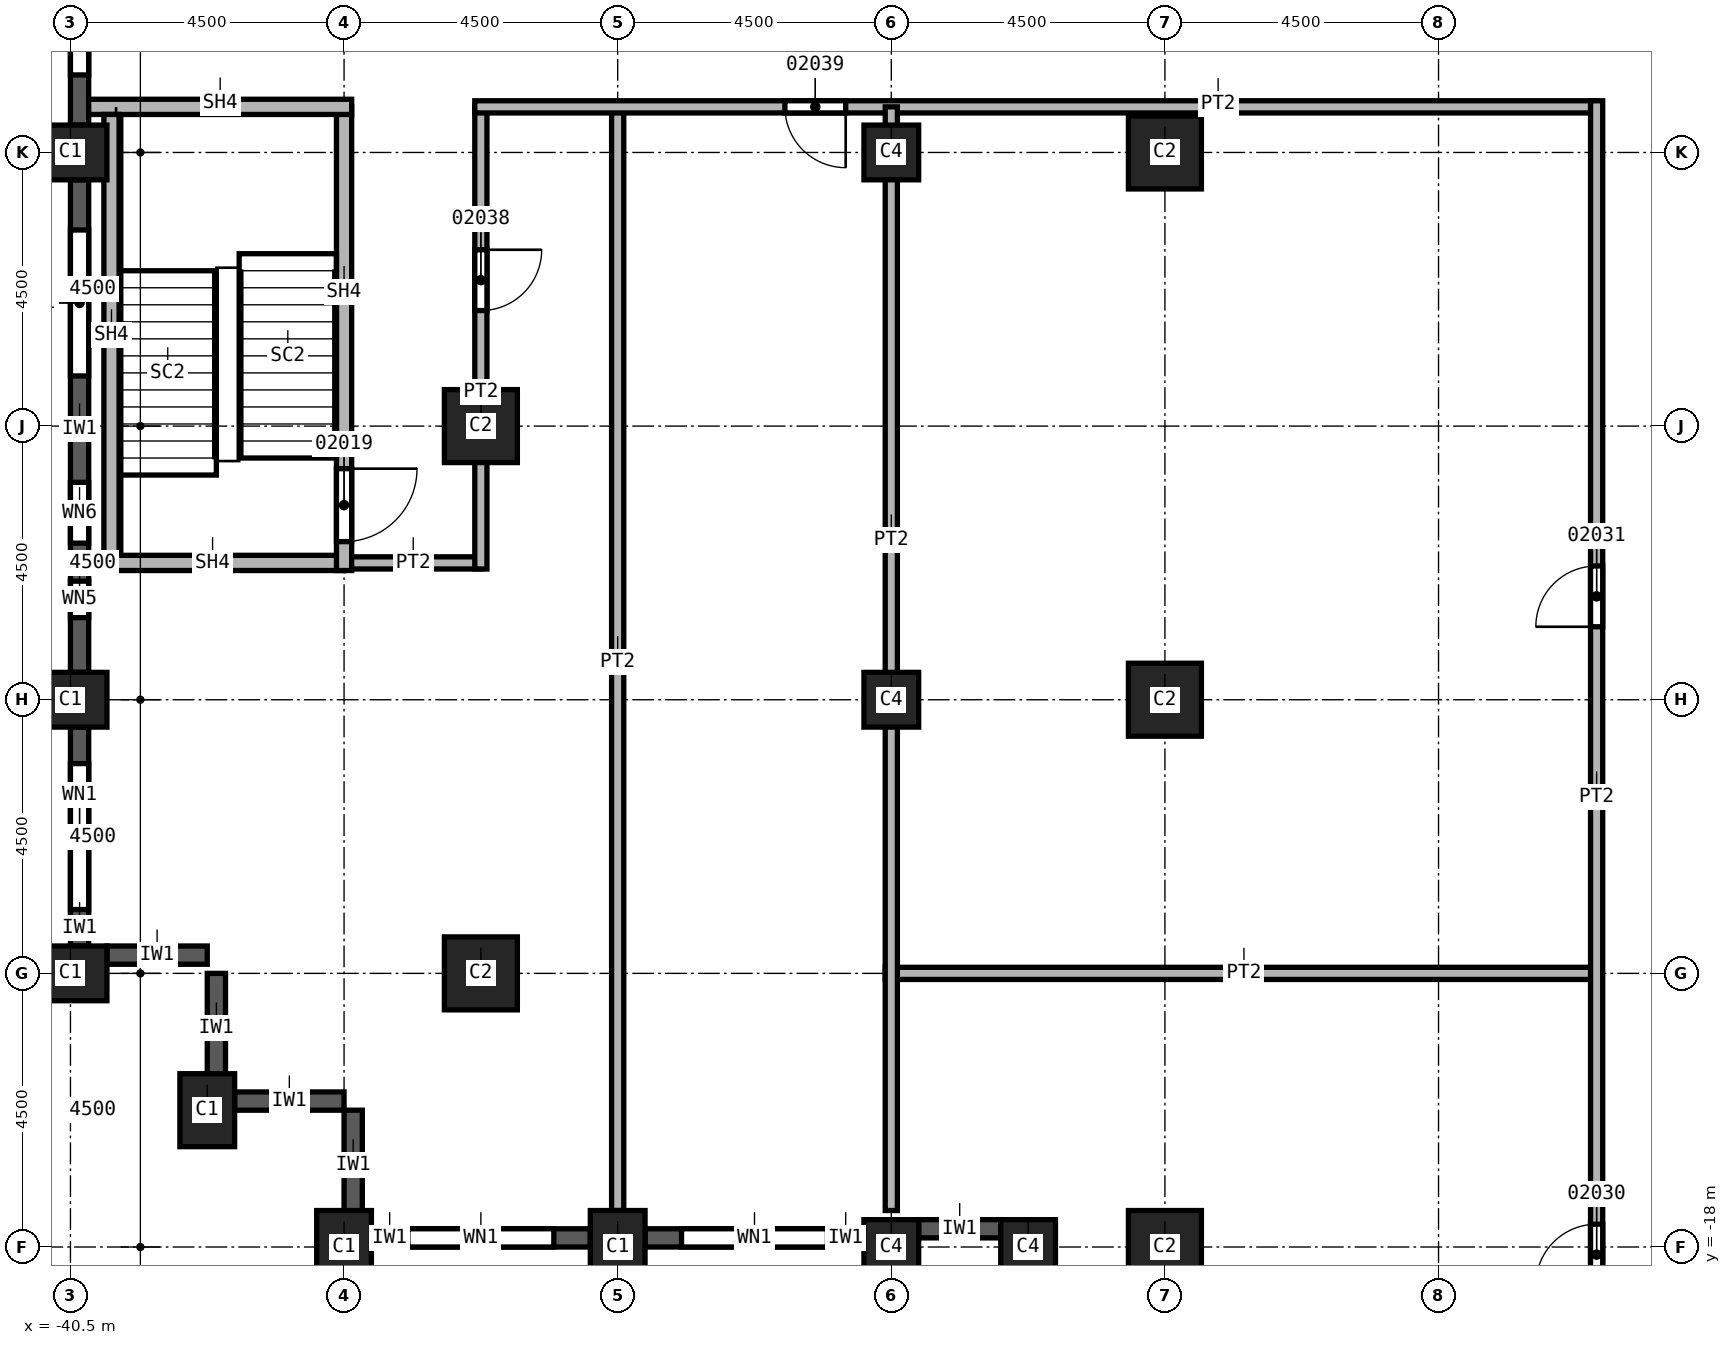
"""IFC4 building model, lengths in metres.
Left out: names, types, materials, properties, quantities, classifications, styles, units other than length and angle.
Written with IfcOpenShell. Run it as: python <this file> out.ifc"""

import sys

from ifc_helpers import new_model, si_unit, direction, frame, frame_2d, origin, origin_2d, place, context, subcontext, project, spatial, rectangle, extrude, element, fill, save


model = new_model("IFC4")
c1 = context("Model", 3, precision=1e-05, world=origin(), true_north=direction((0.0, 1.0)))
c2 = subcontext(c1, "Body", "Model", "MODEL_VIEW")
j1 = project(units=[si_unit("LENGTHUNIT", "METRE"), si_unit("PLANEANGLEUNIT", "RADIAN")], contexts=[c1])
p1 = place(None, origin())
s1 = spatial("IfcSite", under=j1, at=p1, CompositionType="ELEMENT")
p2 = place(p1, origin())
s2 = spatial("IfcBuilding", under=s1, at=p2, CompositionType="ELEMENT")
p3 = place(p2, frame((0.0, 0.0, 80.0)))
s3 = spatial("IfcBuildingStorey", under=s2, at=p3, CompositionType="ELEMENT", Elevation=80.0)
for number, where, z_axis, x_axis in (
    (1, (-40.5, 0.0, 0.0), (0.0, 0.0, 1.0), (0.0, 1.0, 0.0)),
    (2, (-40.5, -9.0, 0.0), (0.0, 0.0, 1.0), (0.0, 1.0, 0.0)),
    (3, (-40.5, -13.5, 0.0), (0.0, 0.0, 1.0), (0.0, 1.0, 0.0)),
    (4, (-38.25, -15.75, 0.0), (0.0, 0.0, 1.0), (1.0, 0.0, 0.0)),
    (5, (-31.5, -18.0, 0.0), (0.0, 0.0, 1.0), (1.0, 0.0, 0.0)),
    (6, (-36.0, -18.0, 0.0), (0.0, 0.0, 1.0), (1.0, 0.0, 0.0)),
):
    element("IfcColumn", number, at=place(p3, frame(where, z_axis=z_axis, x_axis=x_axis)), inside=s3, PredefinedType="COLUMN", context=c2, shape_type="SweptSolid", body=[
        extrude(rectangle(XDim=0.9, YDim=1.2, at=origin_2d()), origin(), (0.0, 0.0, 1.0), 3.7),
    ])
for number, where, z_axis, x_axis in (
    (7, (-33.75, -4.5, 0.0), (0.0, 0.0, 1.0), (1.0, 0.0, 0.0)),
    (8, (-33.75, -13.5, 0.0), (0.0, 0.0, 1.0), (1.0, 0.0, 0.0)),
    (9, (-22.5, 0.0, 0.0), (0.0, 0.0, 1.0), (1.0, 0.0, 0.0)),
    (10, (-22.5, -9.0, 0.0), (0.0, 0.0, 1.0), (1.0, 0.0, 0.0)),
    (11, (-22.5, -18.0, 0.0), (0.0, 0.0, 1.0), (1.0, 0.0, 0.0)),
):
    element("IfcColumn", number, at=place(p3, frame(where, z_axis=z_axis, x_axis=x_axis)), inside=s3, PredefinedType="COLUMN", context=c2, shape_type="SweptSolid", body=[
        extrude(rectangle(XDim=1.2, YDim=1.2, at=origin_2d()), origin(), (0.0, 0.0, 1.0), 3.7),
    ])
for number, where, z_axis, x_axis in (
    (12, (-27.0, 0.0, 0.0), (0.0, 0.0, 1.0), (1.0, 0.0, 0.0)),
    (13, (-27.0, -9.0, 0.0), (0.0, 0.0, 1.0), (1.0, 0.0, 0.0)),
    (14, (-27.0, -18.0, 0.0), (0.0, 0.0, 1.0), (1.0, 0.0, 0.0)),
    (15, (-24.75, -18.0, 0.0), (0.0, 0.0, 1.0), (1.0, 0.0, 0.0)),
):
    element("IfcColumn", number, at=place(p3, frame(where, z_axis=z_axis, x_axis=x_axis)), inside=s3, PredefinedType="COLUMN", context=c2, shape_type="SweptSolid", body=[
        extrude(rectangle(XDim=0.9, YDim=0.9, at=origin_2d()), origin(), (0.0, 0.0, 1.0), 3.7),
    ])
p4 = place(p3, frame((-39.9, -13.2, 0.0), z_axis=(0.0, 0.0, 1.0), x_axis=(1.0, 0.0, 0.0)))
e16 = element("IfcWall", 16, at=p4, inside=s3, PredefinedType="SOLIDWALL", context=c2, shape_type="SweptSolid", body=[
    extrude(rectangle(XDim=1.65, YDim=0.3, at=frame_2d((0.825, 0.0))), origin(), (0.0, 0.0, 1.0), 3.1),
])
for number, where, z_axis, x_axis in (
    (17, (-38.1, -15.3, 0.0), (0.0, 0.0, 1.0), (0.0, 1.0, 0.0)),
    (18, (-37.8, -15.6, 0.0), (0.0, 0.0, 1.0), (1.0, 0.0, 0.0)),
    (19, (-35.85, -17.55, 0.0), (0.0, 0.0, 1.0), (0.0, 1.0, 0.0)),
):
    element("IfcWall", number, at=place(p3, frame(where, z_axis=z_axis, x_axis=x_axis)), inside=s3, PredefinedType="SOLIDWALL", context=c2, shape_type="SweptSolid", body=[
        extrude(rectangle(XDim=1.8, YDim=0.3, at=frame_2d((0.9, 0.0))), origin(), (0.0, 0.0, 1.0), 3.1),
    ])
p5 = place(p3, frame((-40.35, 8.55, 0.0), z_axis=(0.0, 0.0, 1.0), x_axis=(0.0, -1.0, 0.0)))
e20 = element("IfcWall", 20, at=p5, inside=s3, PredefinedType="SOLIDWALL", context=c2, shape_type="SweptSolid", body=[
    extrude(rectangle(XDim=8.1, YDim=0.3, at=frame_2d((4.05, 0.0))), origin(), (0.0, 0.0, 1.0), 3.1),
])
p6 = place(p5, frame((0.825, 0.0, 0.8)))
e21 = element("IfcOpeningElement", 21, at=p6, cuts=e20, PredefinedType="OPENING", context=c2, shape_type="SweptSolid", body=[
    extrude(rectangle(XDim=2.4, YDim=1.95, at=frame_2d((1.2, 0.975))), frame((0.0, 0.15, 0.0), z_axis=(0.0, -1.0, 0.0), x_axis=(1.0, 0.0, 0.0)), (0.0, 0.0, 1.0), 0.3),
])
p7 = place(p5, frame((4.875, 0.0, 0.8)))
e22 = element("IfcOpeningElement", 22, at=p7, cuts=e20, PredefinedType="OPENING", context=c2, shape_type="SweptSolid", body=[
    extrude(rectangle(XDim=2.4, YDim=1.95, at=frame_2d((1.2, 0.975))), frame((0.0, 0.15, 0.0), z_axis=(0.0, -1.0, 0.0), x_axis=(1.0, 0.0, 0.0)), (0.0, 0.0, 1.0), 0.3),
])
p8 = place(p3, frame((-40.35, -0.45, 0.0), z_axis=(0.0, 0.0, 1.0), x_axis=(0.0, -1.0, 0.0)))
e23 = element("IfcWall", 23, at=p8, inside=s3, PredefinedType="SOLIDWALL", context=c2, shape_type="SweptSolid", body=[
    extrude(rectangle(XDim=8.1, YDim=0.3, at=frame_2d((4.05, 0.0))), origin(), (0.0, 0.0, 1.0), 3.1),
])
p9 = place(p8, frame((0.825, 0.0, 0.8)))
e24 = element("IfcOpeningElement", 24, at=p9, cuts=e23, PredefinedType="OPENING", context=c2, shape_type="SweptSolid", body=[
    extrude(rectangle(XDim=2.4, YDim=1.95, at=frame_2d((1.2, 0.975))), frame((0.0, 0.15, 0.0), z_axis=(0.0, -1.0, 0.0), x_axis=(1.0, 0.0, 0.0)), (0.0, 0.0, 1.0), 0.3),
])
p10 = place(p8, frame((4.975, 0.0, 0.8)))
e25 = element("IfcOpeningElement", 25, at=p10, cuts=e23, PredefinedType="OPENING", context=c2, shape_type="SweptSolid", body=[
    extrude(rectangle(XDim=1.0, YDim=1.95, at=frame_2d((0.5, 0.975))), frame((0.0, 0.15, 0.0), z_axis=(0.0, -1.0, 0.0), x_axis=(1.0, 0.0, 0.0)), (0.0, 0.0, 1.0), 0.3),
])
p11 = place(p8, frame((6.6, 0.0, 0.8)))
e26 = element("IfcOpeningElement", 26, at=p11, cuts=e23, PredefinedType="OPENING", context=c2, shape_type="SweptSolid", body=[
    extrude(rectangle(XDim=0.6, YDim=1.95, at=frame_2d((0.3, 0.975))), frame((0.0, 0.15, 0.0), z_axis=(0.0, -1.0, 0.0), x_axis=(1.0, 0.0, 0.0)), (0.0, 0.0, 1.0), 0.3),
])
p12 = place(p3, frame((-40.35, -9.45, 0.0), z_axis=(0.0, 0.0, 1.0), x_axis=(0.0, -1.0, 0.0)))
e27 = element("IfcWall", 27, at=p12, inside=s3, PredefinedType="SOLIDWALL", context=c2, shape_type="SweptSolid", body=[
    extrude(rectangle(XDim=3.6, YDim=0.3, at=frame_2d((1.8, 0.0))), origin(), (0.0, 0.0, 1.0), 3.1),
])
p13 = place(p12, frame((0.6, 0.0, 0.8)))
e28 = element("IfcOpeningElement", 28, at=p13, cuts=e27, PredefinedType="OPENING", context=c2, shape_type="SweptSolid", body=[
    extrude(rectangle(XDim=2.4, YDim=1.95, at=frame_2d((1.2, 0.975))), frame((0.0, 0.15, 0.0), z_axis=(0.0, -1.0, 0.0), x_axis=(1.0, 0.0, 0.0)), (0.0, 0.0, 1.0), 0.3),
])
p14 = place(p3, frame((-35.55, -17.85, 0.0), z_axis=(0.0, 0.0, 1.0), x_axis=(1.0, 0.0, 0.0)))
e29 = element("IfcWall", 29, at=p14, inside=s3, PredefinedType="SOLIDWALL", context=c2, shape_type="SweptSolid", body=[
    extrude(rectangle(XDim=3.6, YDim=0.3, at=frame_2d((1.8, 0.0))), origin(), (0.0, 0.0, 1.0), 3.1),
])
p15 = place(p14, frame((0.6, 0.0, 0.8)))
e30 = element("IfcOpeningElement", 30, at=p15, cuts=e29, PredefinedType="OPENING", context=c2, shape_type="SweptSolid", body=[
    extrude(rectangle(XDim=2.4, YDim=1.95, at=frame_2d((1.2, 0.975))), frame((0.0, 0.15, 0.0), z_axis=(0.0, -1.0, 0.0), x_axis=(1.0, 0.0, 0.0)), (0.0, 0.0, 1.0), 0.3),
])
p16 = place(p3, frame((-31.05, -17.85, 0.0), z_axis=(0.0, 0.0, 1.0), x_axis=(1.0, 0.0, 0.0)))
e31 = element("IfcWall", 31, at=p16, inside=s3, PredefinedType="SOLIDWALL", context=c2, shape_type="SweptSolid", body=[
    extrude(rectangle(XDim=3.6, YDim=0.3, at=frame_2d((1.8, 0.0))), origin(), (0.0, 0.0, 1.0), 3.1),
])
p17 = place(p16, frame((0.6, 0.0, 0.8)))
e32 = element("IfcOpeningElement", 32, at=p17, cuts=e31, PredefinedType="OPENING", context=c2, shape_type="SweptSolid", body=[
    extrude(rectangle(XDim=2.4, YDim=1.95, at=frame_2d((1.2, 0.975))), frame((0.0, 0.15, 0.0), z_axis=(0.0, -1.0, 0.0), x_axis=(1.0, 0.0, 0.0)), (0.0, 0.0, 1.0), 0.3),
])
p18 = place(p3, frame((-26.55, -17.7, 0.0), z_axis=(0.0, 0.0, 1.0), x_axis=(1.0, 0.0, 0.0)))
e33 = element("IfcWall", 33, at=p18, inside=s3, PredefinedType="SOLIDWALL", context=c2, shape_type="SweptSolid", body=[
    extrude(rectangle(XDim=1.35, YDim=0.3, at=frame_2d((0.675, 0.0))), origin(), (0.0, 0.0, 1.0), 3.1),
])
p19 = place(p3, frame((-33.75, -6.75, 0.0), z_axis=(0.0, 0.0, 1.0), x_axis=(-1.0, 0.0, 0.0)))
e34 = element("IfcWall", 34, at=p19, inside=s3, PredefinedType="PARTITIONING", context=c2, shape_type="SweptSolid", body=[
    extrude(rectangle(XDim=2.25, YDim=0.2, at=frame_2d((1.125, 0.0))), origin(), (0.0, 0.0, 1.0), 3.7),
])
p20 = place(p3, frame((-33.75, 0.75, 0.0), z_axis=(0.0, 0.0, 1.0), x_axis=(0.0, -1.0, 0.0)))
e35 = element("IfcWall", 35, at=p20, inside=s3, PredefinedType="PARTITIONING", context=c2, shape_type="SweptSolid", body=[
    extrude(rectangle(XDim=7.6, YDim=0.2, at=frame_2d((3.8, 0.0))), origin(), (0.0, 0.0, 1.0), 3.7),
])
p21 = place(p20, frame((2.35, 0.0, 0.0)))
e36 = element("IfcOpeningElement", 36, at=p21, cuts=e35, PredefinedType="OPENING", context=c2, shape_type="SweptSolid", body=[
    extrude(rectangle(XDim=1.0, YDim=2.1, at=frame_2d((0.5, 1.05))), frame((0.0, 0.1, 0.0), z_axis=(0.0, -1.0, 0.0), x_axis=(1.0, 0.0, 0.0)), (0.0, 0.0, 1.0), 0.2),
])
p22 = place(p3, frame((-31.5, 0.75, 0.0), z_axis=(0.0, 0.0, 1.0), x_axis=(0.0, -1.0, 0.0)))
e37 = element("IfcWall", 37, at=p22, inside=s3, PredefinedType="PARTITIONING", context=c2, shape_type="SweptSolid", body=[
    extrude(rectangle(XDim=18.15, YDim=0.2, at=frame_2d((9.075, 0.0))), origin(), (0.0, 0.0, 1.0), 3.7),
])
p23 = place(p3, frame((-15.4, 0.75, 0.0), z_axis=(0.0, 0.0, 1.0), x_axis=(-1.0, 0.0, 0.0)))
e38 = element("IfcWall", 38, at=p23, inside=s3, PredefinedType="PARTITIONING", context=c2, shape_type="SweptSolid", body=[
    extrude(rectangle(XDim=18.45, YDim=0.2, at=frame_2d((9.225, 0.0))), origin(), (0.0, 0.0, 1.0), 3.7),
])
p24 = place(p23, frame((12.35, 0.0, 0.0)))
e39 = element("IfcOpeningElement", 39, at=p24, cuts=e38, PredefinedType="OPENING", context=c2, shape_type="SweptSolid", body=[
    extrude(rectangle(XDim=1.0, YDim=2.1, at=frame_2d((0.5, 1.05))), frame((0.0, 0.1, 0.0), z_axis=(0.0, -1.0, 0.0), x_axis=(1.0, 0.0, 0.0)), (0.0, 0.0, 1.0), 0.2),
])
p25 = place(p3, frame((-27.1, -13.5, 0.0), z_axis=(0.0, 0.0, 1.0), x_axis=(1.0, 0.0, 0.0)))
e40 = element("IfcWall", 40, at=p25, inside=s3, PredefinedType="PARTITIONING", context=c2, shape_type="SweptSolid", body=[
    extrude(rectangle(XDim=11.7, YDim=0.2, at=frame_2d((5.85, 0.0))), origin(), (0.0, 0.0, 1.0), 3.7),
])
p26 = place(p3, frame((-27.0, -17.4, 0.0), z_axis=(0.0, 0.0, 1.0), x_axis=(0.0, 1.0, 0.0)))
e41 = element("IfcWall", 41, at=p26, inside=s3, PredefinedType="PARTITIONING", context=c2, shape_type="SweptSolid", body=[
    extrude(rectangle(XDim=18.15, YDim=0.2, at=frame_2d((9.075, 0.0))), origin(), (0.0, 0.0, 1.0), 3.7),
])
p27 = place(p3, frame((-15.4, -24.5, 0.0), z_axis=(0.0, 0.0, 1.0), x_axis=(0.0, 1.0, 0.0)))
e42 = element("IfcWall", 42, at=p27, inside=s3, PredefinedType="PARTITIONING", context=c2, shape_type="SweptSolid", body=[
    extrude(rectangle(XDim=25.35, YDim=0.2, at=frame_2d((12.675, 0.0))), origin(), (0.0, 0.0, 1.0), 3.7),
])
p28 = place(p27, frame((2.5, 0.0, 0.0)))
e43 = element("IfcOpeningElement", 43, at=p28, cuts=e42, PredefinedType="OPENING", context=c2, shape_type="SweptSolid", body=[
    extrude(rectangle(XDim=1.0, YDim=2.1, at=frame_2d((0.5, 1.05))), frame((0.0, 0.1, 0.0), z_axis=(0.0, -1.0, 0.0), x_axis=(1.0, 0.0, 0.0)), (0.0, 0.0, 1.0), 0.2),
])
p29 = place(p27, frame((5.875, 0.0, 0.0)))
e44 = element("IfcOpeningElement", 44, at=p29, cuts=e42, PredefinedType="OPENING", context=c2, shape_type="SweptSolid", body=[
    extrude(rectangle(XDim=1.0, YDim=2.1, at=frame_2d((0.5, 1.05))), frame((0.0, 0.1, 0.0), z_axis=(0.0, -1.0, 0.0), x_axis=(1.0, 0.0, 0.0)), (0.0, 0.0, 1.0), 0.2),
])
p30 = place(p27, frame((16.7, 0.0, 0.0)))
e45 = element("IfcOpeningElement", 45, at=p30, cuts=e42, PredefinedType="OPENING", context=c2, shape_type="SweptSolid", body=[
    extrude(rectangle(XDim=1.0, YDim=2.1, at=frame_2d((0.5, 1.05))), frame((0.0, 0.1, 0.0), z_axis=(0.0, -1.0, 0.0), x_axis=(1.0, 0.0, 0.0)), (0.0, 0.0, 1.0), 0.2),
])
p31 = place(p3, frame((-36.0, -6.75, 0.0), z_axis=(0.0, 0.0, 1.0), x_axis=(-1.0, 0.0, 0.0)))
e46 = element("IfcWall", 46, at=p31, inside=s3, PredefinedType="SOLIDWALL", context=c2, shape_type="SweptSolid", body=[
    extrude(rectangle(XDim=4.2, YDim=0.25, at=frame_2d((2.1, 0.0))), origin(), (0.0, 0.0, 1.0), 3.7),
])
p32 = place(p3, frame((-36.0, 0.75, 0.0), z_axis=(0.0, 0.0, 1.0), x_axis=(0.0, -1.0, 0.0)))
e47 = element("IfcWall", 47, at=p32, inside=s3, PredefinedType="SOLIDWALL", context=c2, shape_type="SweptSolid", body=[
    extrude(rectangle(XDim=7.625, YDim=0.25, at=frame_2d((3.812, 0.0))), origin(), (0.0, 0.0, 1.0), 3.7),
])
p33 = place(p32, frame((5.95, 0.0, 0.0)))
e48 = element("IfcOpeningElement", 48, at=p33, cuts=e47, PredefinedType="OPENING", context=c2, shape_type="SweptSolid", body=[
    extrude(rectangle(XDim=1.2, YDim=2.1, at=frame_2d((0.6, 1.05))), frame((0.0, 0.125, 0.0), z_axis=(0.0, -1.0, 0.0), x_axis=(1.0, 0.0, 0.0)), (0.0, 0.0, 1.0), 0.25),
])
p34 = place(p3, frame((-35.875, 0.75, 0.0), z_axis=(0.0, 0.0, 1.0), x_axis=(-1.0, 0.0, 0.0)))
e49 = element("IfcWall", 49, at=p34, inside=s3, PredefinedType="SOLIDWALL", context=c2, shape_type="SweptSolid", body=[
    extrude(rectangle(XDim=4.325, YDim=0.25, at=frame_2d((2.163, 0.0))), origin(), (0.0, 0.0, 1.0), 3.7),
])
p35 = place(p3, frame((-39.825, -6.625, 0.0), z_axis=(0.0, 0.0, 1.0), x_axis=(0.0, 1.0, 0.0)))
e50 = element("IfcWall", 50, at=p35, inside=s3, PredefinedType="SOLIDWALL", context=c2, shape_type="SweptSolid", body=[
    extrude(rectangle(XDim=7.25, YDim=0.25, at=frame_2d((3.625, 0.0))), origin(), (0.0, 0.0, 1.0), 3.7),
])
p36 = place(p7, origin())
e51 = element("IfcWindow", 51, at=p36, inside=s3, PartitioningType="SINGLE_PANEL", PredefinedType="WINDOW", context=c2, shape_type="SweptSolid", body=[
    extrude(rectangle(XDim=2.4, YDim=1.95, at=frame_2d((1.2, 0.975))), frame((0.0, 0.03, 0.0), z_axis=(0.0, -1.0, 0.0), x_axis=(1.0, 0.0, 0.0)), (0.0, 0.0, 1.0), 0.06),
])
fill(e22, e51)
p37 = place(p9, origin())
e52 = element("IfcWindow", 52, at=p37, inside=s3, PartitioningType="SINGLE_PANEL", PredefinedType="WINDOW", context=c2, shape_type="SweptSolid", body=[
    extrude(rectangle(XDim=2.4, YDim=1.95, at=frame_2d((1.2, 0.975))), frame((0.0, 0.03, 0.0), z_axis=(0.0, -1.0, 0.0), x_axis=(1.0, 0.0, 0.0)), (0.0, 0.0, 1.0), 0.06),
])
fill(e24, e52)
p38 = place(p13, origin())
e53 = element("IfcWindow", 53, at=p38, inside=s3, PartitioningType="SINGLE_PANEL", PredefinedType="WINDOW", context=c2, shape_type="SweptSolid", body=[
    extrude(rectangle(XDim=2.4, YDim=1.95, at=frame_2d((1.2, 0.975))), frame((0.0, 0.03, 0.0), z_axis=(0.0, -1.0, 0.0), x_axis=(1.0, 0.0, 0.0)), (0.0, 0.0, 1.0), 0.06),
])
fill(e28, e53)
p39 = place(p15, origin())
e54 = element("IfcWindow", 54, at=p39, inside=s3, PartitioningType="SINGLE_PANEL", PredefinedType="WINDOW", context=c2, shape_type="SweptSolid", body=[
    extrude(rectangle(XDim=2.4, YDim=1.95, at=frame_2d((1.2, 0.975))), frame((0.0, 0.03, 0.0), z_axis=(0.0, -1.0, 0.0), x_axis=(1.0, 0.0, 0.0)), (0.0, 0.0, 1.0), 0.06),
])
fill(e30, e54)
p40 = place(p17, origin())
e55 = element("IfcWindow", 55, at=p40, inside=s3, PartitioningType="SINGLE_PANEL", PredefinedType="WINDOW", context=c2, shape_type="SweptSolid", body=[
    extrude(rectangle(XDim=2.4, YDim=1.95, at=frame_2d((1.2, 0.975))), frame((0.0, 0.03, 0.0), z_axis=(0.0, -1.0, 0.0), x_axis=(1.0, 0.0, 0.0)), (0.0, 0.0, 1.0), 0.06),
])
fill(e32, e55)
p41 = place(p33, origin())
e56 = element("IfcDoor", 56, at=p41, inside=s3, OperationType="SINGLE_SWING_RIGHT", PredefinedType="DOOR", context=c2, shape_type="SweptSolid", body=[
    extrude(rectangle(XDim=1.2, YDim=2.1, at=frame_2d((0.6, 1.05))), frame((0.0, 0.025, 0.0), z_axis=(0.0, -1.0, 0.0), x_axis=(1.0, 0.0, 0.0)), (0.0, 0.0, 1.0), 0.05),
])
fill(e48, e56)
p42 = place(p29, origin())
e57 = element("IfcDoor", 57, at=p42, inside=s3, OperationType="SINGLE_SWING_LEFT", PredefinedType="DOOR", context=c2, shape_type="SweptSolid", body=[
    extrude(rectangle(XDim=1.0, YDim=2.1, at=frame_2d((0.5, 1.05))), frame((0.0, 0.025, 0.0), z_axis=(0.0, -1.0, 0.0), x_axis=(1.0, 0.0, 0.0)), (0.0, 0.0, 1.0), 0.05),
])
fill(e44, e57)
p43 = place(p30, origin())
e58 = element("IfcDoor", 58, at=p43, inside=s3, OperationType="SINGLE_SWING_RIGHT", PredefinedType="DOOR", context=c2, shape_type="SweptSolid", body=[
    extrude(rectangle(XDim=1.0, YDim=2.1, at=frame_2d((0.5, 1.05))), frame((0.0, 0.025, 0.0), z_axis=(0.0, -1.0, 0.0), x_axis=(1.0, 0.0, 0.0)), (0.0, 0.0, 1.0), 0.05),
])
fill(e45, e58)
p44 = place(p21, origin())
e59 = element("IfcDoor", 59, at=p44, inside=s3, OperationType="SINGLE_SWING_LEFT", PredefinedType="DOOR", context=c2, shape_type="SweptSolid", body=[
    extrude(rectangle(XDim=1.0, YDim=2.1, at=frame_2d((0.5, 1.05))), frame((0.0, 0.025, 0.0), z_axis=(0.0, -1.0, 0.0), x_axis=(1.0, 0.0, 0.0)), (0.0, 0.0, 1.0), 0.05),
])
fill(e36, e59)
p45 = place(p24, origin())
e60 = element("IfcDoor", 60, at=p45, inside=s3, OperationType="SINGLE_SWING_RIGHT", PredefinedType="DOOR", context=c2, shape_type="SweptSolid", body=[
    extrude(rectangle(XDim=1.0, YDim=2.1, at=frame_2d((0.5, 1.05))), frame((0.0, 0.025, 0.0), z_axis=(0.0, -1.0, 0.0), x_axis=(1.0, 0.0, 0.0)), (0.0, 0.0, 1.0), 0.05),
])
fill(e39, e60)
p46 = place(p10, origin())
e61 = element("IfcWindow", 61, at=p46, inside=s3, PartitioningType="SINGLE_PANEL", PredefinedType="WINDOW", context=c2, shape_type="SweptSolid", body=[
    extrude(rectangle(XDim=1.0, YDim=1.95, at=frame_2d((0.5, 0.975))), frame((0.0, 0.03, 0.0), z_axis=(0.0, -1.0, 0.0), x_axis=(1.0, 0.0, 0.0)), (0.0, 0.0, 1.0), 0.06),
])
fill(e25, e61)
p47 = place(p11, origin())
e62 = element("IfcWindow", 62, at=p47, inside=s3, PartitioningType="SINGLE_PANEL", PredefinedType="WINDOW", context=c2, shape_type="SweptSolid", body=[
    extrude(rectangle(XDim=0.6, YDim=1.95, at=frame_2d((0.3, 0.975))), frame((0.0, 0.03, 0.0), z_axis=(0.0, -1.0, 0.0), x_axis=(1.0, 0.0, 0.0)), (0.0, 0.0, 1.0), 0.06),
])
fill(e26, e62)
save(model, sys.argv[1])
